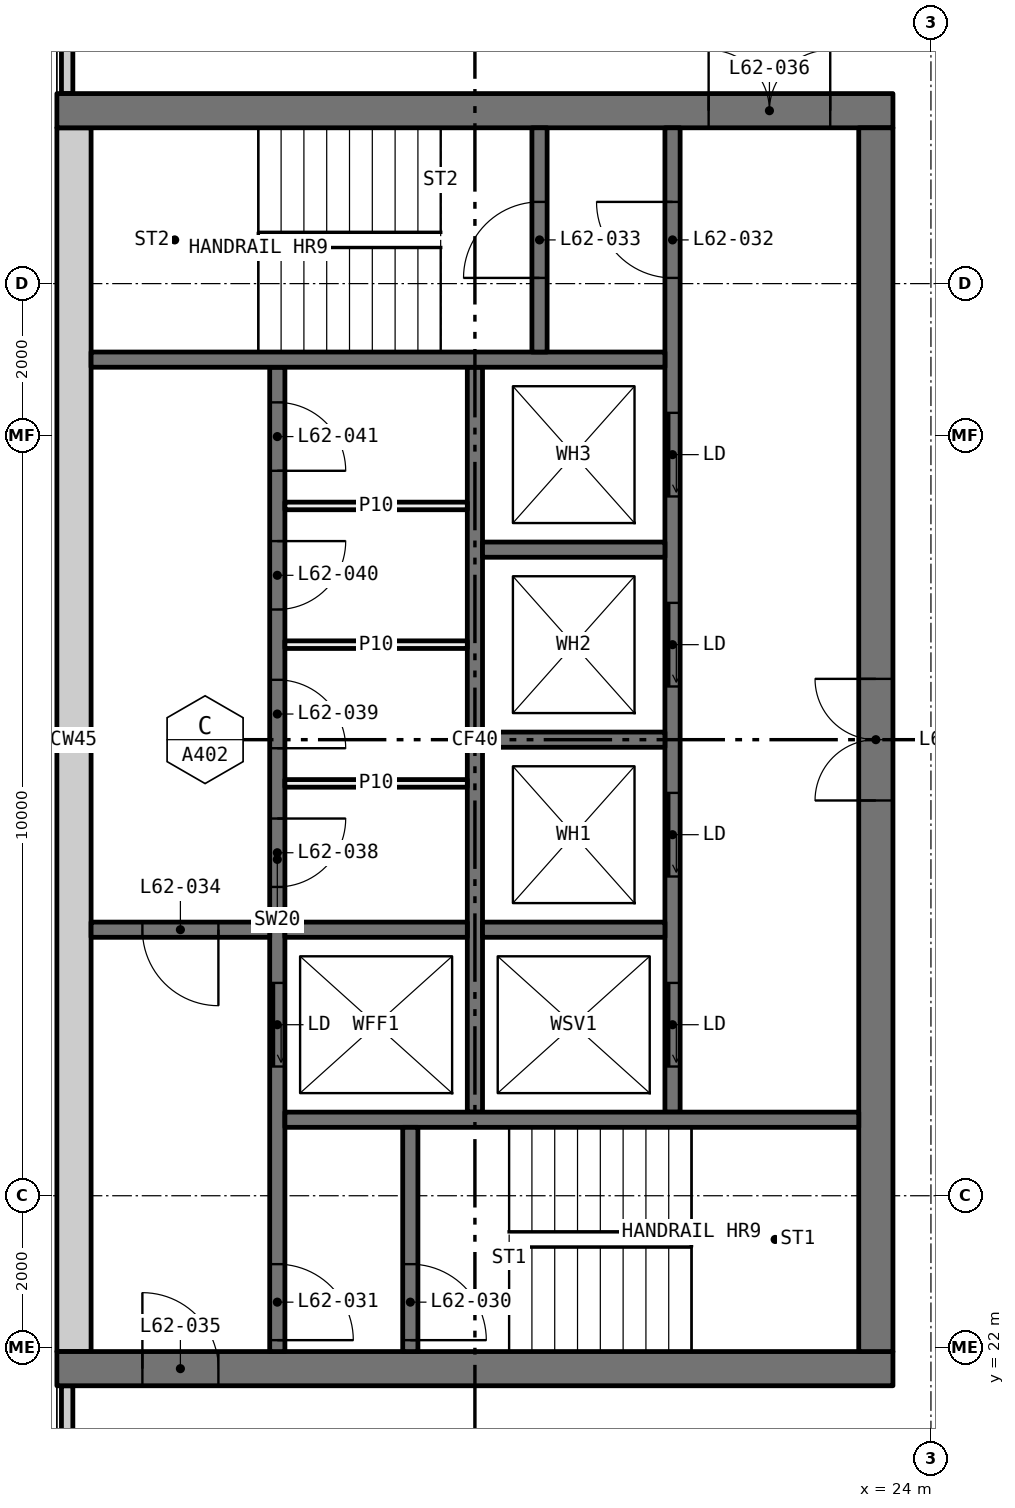
"""IFC4 building model, lengths in metres.
Left out: names, types, materials, properties, quantities, classifications, styles, units other than length and angle.
Written with IfcOpenShell. Run it as: python <this file> out.ifc"""

import sys

from ifc_helpers import new_model, si_unit, direction, frame, frame_2d, origin, place, context, subcontext, project, spatial, rectangle, extrude, element, fill, save


model = new_model("IFC4")
c1 = context("Model", 3, precision=1e-05, world=origin(), true_north=direction((0.0, 1.0)))
c2 = subcontext(c1, "Body", "Model", "MODEL_VIEW")
j1 = project(units=[si_unit("LENGTHUNIT", "METRE"), si_unit("PLANEANGLEUNIT", "RADIAN")], contexts=[c1])
p1 = place(None, origin())
s1 = spatial("IfcSite", under=j1, at=p1, CompositionType="ELEMENT")
p2 = place(p1, origin())
s2 = spatial("IfcBuilding", under=s1, at=p2, CompositionType="ELEMENT")
p3 = place(p2, frame((0.0, 0.0, 231.75)))
s3 = spatial("IfcBuildingStorey", under=s2, at=p3, CompositionType="ELEMENT", Elevation=231.75)
for number, where, z_axis, x_axis in (
    (1, (12.635, 18.71, 0.0), (0.0, 0.0, 1.0), (0.0, 1.0, 0.0)),
    (2, (12.635, 38.5, 0.0), (0.0, 0.0, 1.0), (0.0, 1.0, 0.0)),
):
    element("IfcWall", number, at=place(p3, frame(where, z_axis=z_axis, x_axis=x_axis)), inside=s3, PredefinedType="ELEMENTEDWALL", context=c2, shape_type="SweptSolid", body=[
        extrude(rectangle(XDim=2.79, YDim=0.15, at=frame_2d((1.395, 0.0))), origin(), (0.0, 0.0, 1.0), 3.05),
    ])
p4 = place(p3, frame((12.5, 21.725, 0.0), z_axis=(0.0, 0.0, 1.0), x_axis=(1.0, 0.0, 0.0)))
e3 = element("IfcWall", 3, at=p4, inside=s3, PredefinedType="SHEAR", context=c2, shape_type="SweptSolid", body=[
    extrude(rectangle(XDim=11.0, YDim=0.45, at=frame_2d((5.5, 0.0))), origin(), (0.0, 0.0, 1.0), 3.05),
])
p5 = place(p4, frame((1.125, 0.0, 0.0)))
e4 = element("IfcOpeningElement", 4, at=p5, cuts=e3, PredefinedType="OPENING", context=c2, shape_type="SweptSolid", body=[
    extrude(rectangle(XDim=1.0, YDim=2.1, at=frame_2d((0.5, 1.05))), frame((0.0, 0.235, 0.0), z_axis=(0.0, -1.0, 0.0), x_axis=(1.0, 0.0, 0.0)), (0.0, 0.0, 1.0), 0.47),
])
p6 = place(p3, frame((12.5, 38.275, 0.0), z_axis=(0.0, 0.0, 1.0), x_axis=(1.0, 0.0, 0.0)))
e5 = element("IfcWall", 5, at=p6, inside=s3, PredefinedType="SHEAR", context=c2, shape_type="SweptSolid", body=[
    extrude(rectangle(XDim=11.0, YDim=0.45, at=frame_2d((5.5, 0.0))), origin(), (0.0, 0.0, 1.0), 3.05),
])
p7 = place(p6, frame((8.575, 0.0, 0.0)))
e6 = element("IfcOpeningElement", 6, at=p7, cuts=e5, PredefinedType="OPENING", context=c2, shape_type="SweptSolid", body=[
    extrude(rectangle(XDim=1.6, YDim=2.1, at=frame_2d((0.8, 1.05))), frame((0.0, 0.235, 0.0), z_axis=(0.0, -1.0, 0.0), x_axis=(1.0, 0.0, 0.0)), (0.0, 0.0, 1.0), 0.47),
])
p8 = place(p3, frame((12.725, 21.95, 0.0), z_axis=(0.0, 0.0, 1.0), x_axis=(0.0, 1.0, 0.0)))
e7 = element("IfcWall", 7, at=p8, inside=s3, PredefinedType="SHEAR", context=c2, shape_type="SweptSolid", body=[
    extrude(rectangle(XDim=16.1, YDim=0.45, at=frame_2d((8.05, 0.0))), origin(), (0.0, 0.0, 1.0), 3.05),
])
p9 = place(p3, frame((23.275, 21.95, 0.0), z_axis=(0.0, 0.0, 1.0), x_axis=(0.0, 1.0, 0.0)))
e8 = element("IfcWall", 8, at=p9, inside=s3, PredefinedType="SHEAR", context=c2, shape_type="SweptSolid", body=[
    extrude(rectangle(XDim=16.1, YDim=0.45, at=frame_2d((8.05, 0.0))), origin(), (0.0, 0.0, 1.0), 3.05),
])
p10 = place(p9, frame((7.25, 0.0, 0.0)))
e9 = element("IfcOpeningElement", 9, at=p10, cuts=e8, PredefinedType="OPENING", context=c2, shape_type="SweptSolid", body=[
    extrude(rectangle(XDim=1.6, YDim=2.1, at=frame_2d((0.8, 1.05))), frame((0.0, 0.235, 0.0), z_axis=(0.0, -1.0, 0.0), x_axis=(1.0, 0.0, 0.0)), (0.0, 0.0, 1.0), 0.47),
])
p11 = place(p3, frame((15.4, 21.95, 0.0), z_axis=(0.0, 0.0, 1.0), x_axis=(0.0, 1.0, 0.0)))
e10 = element("IfcWall", 10, at=p11, inside=s3, PredefinedType="SOLIDWALL", context=c2, shape_type="SweptSolid", body=[
    extrude(rectangle(XDim=12.95, YDim=0.2, at=frame_2d((6.475, 0.0))), origin(), (0.0, 0.0, 1.0), 3.05),
])
p12 = place(p11, frame((3.75, 0.0, 0.0)))
e11 = element("IfcOpeningElement", 11, at=p12, cuts=e10, PredefinedType="OPENING", context=c2, shape_type="SweptSolid", body=[
    extrude(rectangle(XDim=1.1, YDim=2.1, at=frame_2d((0.55, 1.05))), frame((0.0, 0.11, 0.0), z_axis=(0.0, -1.0, 0.0), x_axis=(1.0, 0.0, 0.0)), (0.0, 0.0, 1.0), 0.22),
])
p13 = place(p11, frame((0.15, 0.0, 0.0)))
e12 = element("IfcOpeningElement", 12, at=p13, cuts=e10, PredefinedType="OPENING", context=c2, shape_type="SweptSolid", body=[
    extrude(rectangle(XDim=1.0, YDim=2.1, at=frame_2d((0.5, 1.05))), frame((0.0, 0.11, 0.0), z_axis=(0.0, -1.0, 0.0), x_axis=(1.0, 0.0, 0.0)), (0.0, 0.0, 1.0), 0.22),
])
p14 = place(p11, frame((6.113, 0.0, 0.0)))
e13 = element("IfcOpeningElement", 13, at=p14, cuts=e10, PredefinedType="OPENING", context=c2, shape_type="SweptSolid", body=[
    extrude(rectangle(XDim=0.9, YDim=2.1, at=frame_2d((0.45, 1.05))), frame((0.0, 0.11, 0.0), z_axis=(0.0, -1.0, 0.0), x_axis=(1.0, 0.0, 0.0)), (0.0, 0.0, 1.0), 0.22),
])
p15 = place(p11, frame((7.938, 0.0, 0.0)))
e14 = element("IfcOpeningElement", 14, at=p15, cuts=e10, PredefinedType="OPENING", context=c2, shape_type="SweptSolid", body=[
    extrude(rectangle(XDim=0.9, YDim=2.1, at=frame_2d((0.45, 1.05))), frame((0.0, 0.11, 0.0), z_axis=(0.0, -1.0, 0.0), x_axis=(1.0, 0.0, 0.0)), (0.0, 0.0, 1.0), 0.22),
])
p16 = place(p11, frame((9.762, 0.0, 0.0)))
e15 = element("IfcOpeningElement", 15, at=p16, cuts=e10, PredefinedType="OPENING", context=c2, shape_type="SweptSolid", body=[
    extrude(rectangle(XDim=0.9, YDim=2.1, at=frame_2d((0.45, 1.05))), frame((0.0, 0.11, 0.0), z_axis=(0.0, -1.0, 0.0), x_axis=(1.0, 0.0, 0.0)), (0.0, 0.0, 1.0), 0.22),
])
p17 = place(p11, frame((11.587, 0.0, 0.0)))
e16 = element("IfcOpeningElement", 16, at=p17, cuts=e10, PredefinedType="OPENING", context=c2, shape_type="SweptSolid", body=[
    extrude(rectangle(XDim=0.9, YDim=2.1, at=frame_2d((0.45, 1.05))), frame((0.0, 0.11, 0.0), z_axis=(0.0, -1.0, 0.0), x_axis=(1.0, 0.0, 0.0)), (0.0, 0.0, 1.0), 0.22),
])
p18 = place(p3, frame((20.6, 25.1, 0.0), z_axis=(0.0, 0.0, 1.0), x_axis=(0.0, 1.0, 0.0)))
e17 = element("IfcWall", 17, at=p18, inside=s3, PredefinedType="SOLIDWALL", context=c2, shape_type="SweptSolid", body=[
    extrude(rectangle(XDim=12.95, YDim=0.2, at=frame_2d((6.475, 0.0))), origin(), (0.0, 0.0, 1.0), 3.05),
])
p19 = place(p18, frame((0.6, 0.0, 0.0)))
e18 = element("IfcOpeningElement", 18, at=p19, cuts=e17, PredefinedType="OPENING", context=c2, shape_type="SweptSolid", body=[
    extrude(rectangle(XDim=1.1, YDim=2.1, at=frame_2d((0.55, 1.05))), frame((0.0, 0.11, 0.0), z_axis=(0.0, -1.0, 0.0), x_axis=(1.0, 0.0, 0.0)), (0.0, 0.0, 1.0), 0.22),
])
p20 = place(p18, frame((3.1, 0.0, 0.0)))
e19 = element("IfcOpeningElement", 19, at=p20, cuts=e17, PredefinedType="OPENING", context=c2, shape_type="SweptSolid", body=[
    extrude(rectangle(XDim=1.1, YDim=2.1, at=frame_2d((0.55, 1.05))), frame((0.0, 0.11, 0.0), z_axis=(0.0, -1.0, 0.0), x_axis=(1.0, 0.0, 0.0)), (0.0, 0.0, 1.0), 0.22),
])
p21 = place(p18, frame((5.6, 0.0, 0.0)))
e20 = element("IfcOpeningElement", 20, at=p21, cuts=e17, PredefinedType="OPENING", context=c2, shape_type="SweptSolid", body=[
    extrude(rectangle(XDim=1.1, YDim=2.1, at=frame_2d((0.55, 1.05))), frame((0.0, 0.11, 0.0), z_axis=(0.0, -1.0, 0.0), x_axis=(1.0, 0.0, 0.0)), (0.0, 0.0, 1.0), 0.22),
])
p22 = place(p18, frame((8.1, 0.0, 0.0)))
e21 = element("IfcOpeningElement", 21, at=p22, cuts=e17, PredefinedType="OPENING", context=c2, shape_type="SweptSolid", body=[
    extrude(rectangle(XDim=1.1, YDim=2.1, at=frame_2d((0.55, 1.05))), frame((0.0, 0.11, 0.0), z_axis=(0.0, -1.0, 0.0), x_axis=(1.0, 0.0, 0.0)), (0.0, 0.0, 1.0), 0.22),
])
p23 = place(p18, frame((10.975, 0.0, 0.0)))
e22 = element("IfcOpeningElement", 22, at=p23, cuts=e17, PredefinedType="OPENING", context=c2, shape_type="SweptSolid", body=[
    extrude(rectangle(XDim=1.0, YDim=2.1, at=frame_2d((0.5, 1.05))), frame((0.0, 0.11, 0.0), z_axis=(0.0, -1.0, 0.0), x_axis=(1.0, 0.0, 0.0)), (0.0, 0.0, 1.0), 0.22),
])
p24 = place(p3, frame((18.0, 25.1, 0.0), z_axis=(0.0, 0.0, 1.0), x_axis=(0.0, 1.0, 0.0)))
e23 = element("IfcWall", 23, at=p24, inside=s3, PredefinedType="SOLIDWALL", context=c2, shape_type="SweptSolid", body=[
    extrude(rectangle(XDim=9.8, YDim=0.2, at=frame_2d((4.9, 0.0))), origin(), (0.0, 0.0, 1.0), 3.05),
])
for number, where, z_axis, x_axis in (
    (24, (15.5, 25.0, 0.0), (0.0, 0.0, 1.0), (1.0, 0.0, 0.0)),
    (25, (12.95, 35.0, 0.0), (0.0, 0.0, 1.0), (1.0, 0.0, 0.0)),
):
    element("IfcWall", number, at=place(p3, frame(where, z_axis=z_axis, x_axis=x_axis)), inside=s3, PredefinedType="SOLIDWALL", context=c2, shape_type="SweptSolid", body=[
        extrude(rectangle(XDim=7.55, YDim=0.2, at=frame_2d((3.775, 0.0))), origin(), (0.0, 0.0, 1.0), 3.05),
    ])
p25 = place(p3, frame((12.95, 27.5, 0.0), z_axis=(0.0, 0.0, 1.0), x_axis=(1.0, 0.0, 0.0)))
e26 = element("IfcWall", 26, at=p25, inside=s3, PredefinedType="SOLIDWALL", context=c2, shape_type="SweptSolid", body=[
    extrude(rectangle(XDim=2.35, YDim=0.2, at=frame_2d((1.175, 0.0))), origin(), (0.0, 0.0, 1.0), 3.05),
])
p26 = place(p25, frame((0.675, 0.0, 0.0)))
e27 = element("IfcOpeningElement", 27, at=p26, cuts=e26, PredefinedType="OPENING", context=c2, shape_type="SweptSolid", body=[
    extrude(rectangle(XDim=1.0, YDim=2.1, at=frame_2d((0.5, 1.05))), frame((0.0, 0.11, 0.0), z_axis=(0.0, -1.0, 0.0), x_axis=(1.0, 0.0, 0.0)), (0.0, 0.0, 1.0), 0.22),
])
p27 = place(p3, frame((17.15, 21.95, 0.0), z_axis=(0.0, 0.0, 1.0), x_axis=(0.0, 1.0, 0.0)))
e28 = element("IfcWall", 28, at=p27, inside=s3, PredefinedType="SOLIDWALL", context=c2, shape_type="SweptSolid", body=[
    extrude(rectangle(XDim=2.95, YDim=0.2, at=frame_2d((1.475, 0.0))), origin(), (0.0, 0.0, 1.0), 3.05),
])
p28 = place(p27, frame((0.15, 0.0, 0.0)))
e29 = element("IfcOpeningElement", 29, at=p28, cuts=e28, PredefinedType="OPENING", context=c2, shape_type="SweptSolid", body=[
    extrude(rectangle(XDim=1.0, YDim=2.1, at=frame_2d((0.5, 1.05))), frame((0.0, 0.11, 0.0), z_axis=(0.0, -1.0, 0.0), x_axis=(1.0, 0.0, 0.0)), (0.0, 0.0, 1.0), 0.22),
])
p29 = place(p3, frame((18.85, 35.1, 0.0), z_axis=(0.0, 0.0, 1.0), x_axis=(0.0, 1.0, 0.0)))
e30 = element("IfcWall", 30, at=p29, inside=s3, PredefinedType="SOLIDWALL", context=c2, shape_type="SweptSolid", body=[
    extrude(rectangle(XDim=2.95, YDim=0.2, at=frame_2d((1.475, 0.0))), origin(), (0.0, 0.0, 1.0), 3.05),
])
p30 = place(p29, frame((0.975, 0.0, 0.0)))
e31 = element("IfcOpeningElement", 31, at=p30, cuts=e30, PredefinedType="OPENING", context=c2, shape_type="SweptSolid", body=[
    extrude(rectangle(XDim=1.0, YDim=2.1, at=frame_2d((0.5, 1.05))), frame((0.0, 0.11, 0.0), z_axis=(0.0, -1.0, 0.0), x_axis=(1.0, 0.0, 0.0)), (0.0, 0.0, 1.0), 0.22),
])
for number, where, z_axis, x_axis in (
    (32, (15.5, 27.5, 0.0), (0.0, 0.0, 1.0), (1.0, 0.0, 0.0)),
    (33, (18.1, 27.5, 0.0), (0.0, 0.0, 1.0), (1.0, 0.0, 0.0)),
    (34, (18.1, 30.0, 0.0), (0.0, 0.0, 1.0), (1.0, 0.0, 0.0)),
    (35, (18.1, 32.5, 0.0), (0.0, 0.0, 1.0), (1.0, 0.0, 0.0)),
):
    element("IfcWall", number, at=place(p3, frame(where, z_axis=z_axis, x_axis=x_axis)), inside=s3, PredefinedType="SOLIDWALL", context=c2, shape_type="SweptSolid", body=[
        extrude(rectangle(XDim=2.4, YDim=0.2, at=frame_2d((1.2, 0.0))), origin(), (0.0, 0.0, 1.0), 3.05),
    ])
for number, where, z_axis, x_axis in (
    (36, (15.5, 29.425, 0.0), (0.0, 0.0, 1.0), (1.0, 0.0, 0.0)),
    (37, (15.5, 31.25, 0.0), (0.0, 0.0, 1.0), (1.0, 0.0, 0.0)),
    (38, (15.5, 33.075, 0.0), (0.0, 0.0, 1.0), (1.0, 0.0, 0.0)),
):
    element("IfcWall", number, at=place(p3, frame(where, z_axis=z_axis, x_axis=x_axis)), inside=s3, PredefinedType="PARTITIONING", context=c2, shape_type="SweptSolid", body=[
        extrude(rectangle(XDim=2.4, YDim=0.1, at=frame_2d((1.2, 0.0))), origin(), (0.0, 0.0, 1.0), 3.05),
    ])
p31 = place(p19, origin())
e39 = element("IfcDoor", 39, at=p31, inside=s3, OperationType="SLIDING_TO_LEFT", PredefinedType="DOOR", context=c2, shape_type="SweptSolid", body=[
    extrude(rectangle(XDim=1.1, YDim=2.1, at=frame_2d((0.55, 1.05))), frame((0.0, 0.025, 0.0), z_axis=(0.0, -1.0, 0.0), x_axis=(1.0, 0.0, 0.0)), (0.0, 0.0, 1.0), 0.05),
])
fill(e18, e39)
p32 = place(p20, origin())
e40 = element("IfcDoor", 40, at=p32, inside=s3, OperationType="SLIDING_TO_LEFT", PredefinedType="DOOR", context=c2, shape_type="SweptSolid", body=[
    extrude(rectangle(XDim=1.1, YDim=2.1, at=frame_2d((0.55, 1.05))), frame((0.0, 0.025, 0.0), z_axis=(0.0, -1.0, 0.0), x_axis=(1.0, 0.0, 0.0)), (0.0, 0.0, 1.0), 0.05),
])
fill(e19, e40)
p33 = place(p21, origin())
e41 = element("IfcDoor", 41, at=p33, inside=s3, OperationType="SLIDING_TO_LEFT", PredefinedType="DOOR", context=c2, shape_type="SweptSolid", body=[
    extrude(rectangle(XDim=1.1, YDim=2.1, at=frame_2d((0.55, 1.05))), frame((0.0, 0.025, 0.0), z_axis=(0.0, -1.0, 0.0), x_axis=(1.0, 0.0, 0.0)), (0.0, 0.0, 1.0), 0.05),
])
fill(e20, e41)
p34 = place(p22, origin())
e42 = element("IfcDoor", 42, at=p34, inside=s3, OperationType="SLIDING_TO_LEFT", PredefinedType="DOOR", context=c2, shape_type="SweptSolid", body=[
    extrude(rectangle(XDim=1.1, YDim=2.1, at=frame_2d((0.55, 1.05))), frame((0.0, 0.025, 0.0), z_axis=(0.0, -1.0, 0.0), x_axis=(1.0, 0.0, 0.0)), (0.0, 0.0, 1.0), 0.05),
])
fill(e21, e42)
p35 = place(p12, origin())
e43 = element("IfcDoor", 43, at=p35, inside=s3, OperationType="SLIDING_TO_LEFT", PredefinedType="DOOR", context=c2, shape_type="SweptSolid", body=[
    extrude(rectangle(XDim=1.1, YDim=2.1, at=frame_2d((0.55, 1.05))), frame((0.0, 0.025, 0.0), z_axis=(0.0, -1.0, 0.0), x_axis=(1.0, 0.0, 0.0)), (0.0, 0.0, 1.0), 0.05),
])
fill(e11, e43)
p36 = place(p28, frame((1.0, 0.0, 0.0), x_axis=(-1.0, 0.0, 0.0)))
e44 = element("IfcDoor", 44, at=p36, inside=s3, OperationType="SINGLE_SWING_LEFT", PredefinedType="DOOR", context=c2, shape_type="SweptSolid", body=[
    extrude(rectangle(XDim=1.0, YDim=2.1, at=frame_2d((0.5, 1.05))), frame((0.0, 0.025, 0.0), z_axis=(0.0, -1.0, 0.0), x_axis=(1.0, 0.0, 0.0)), (0.0, 0.0, 1.0), 0.05),
])
fill(e29, e44)
p37 = place(p13, frame((1.0, 0.0, 0.0), x_axis=(-1.0, 0.0, 0.0)))
e45 = element("IfcDoor", 45, at=p37, inside=s3, OperationType="SINGLE_SWING_LEFT", PredefinedType="DOOR", context=c2, shape_type="SweptSolid", body=[
    extrude(rectangle(XDim=1.0, YDim=2.1, at=frame_2d((0.5, 1.05))), frame((0.0, 0.025, 0.0), z_axis=(0.0, -1.0, 0.0), x_axis=(1.0, 0.0, 0.0)), (0.0, 0.0, 1.0), 0.05),
])
fill(e12, e45)
p38 = place(p23, origin())
e46 = element("IfcDoor", 46, at=p38, inside=s3, OperationType="SINGLE_SWING_LEFT", PredefinedType="DOOR", context=c2, shape_type="SweptSolid", body=[
    extrude(rectangle(XDim=1.0, YDim=2.1, at=frame_2d((0.5, 1.05))), frame((0.0, 0.025, 0.0), z_axis=(0.0, -1.0, 0.0), x_axis=(1.0, 0.0, 0.0)), (0.0, 0.0, 1.0), 0.05),
])
fill(e22, e46)
p39 = place(p30, origin())
e47 = element("IfcDoor", 47, at=p39, inside=s3, OperationType="SINGLE_SWING_RIGHT", PredefinedType="DOOR", context=c2, shape_type="SweptSolid", body=[
    extrude(rectangle(XDim=1.0, YDim=2.1, at=frame_2d((0.5, 1.05))), frame((0.0, 0.025, 0.0), z_axis=(0.0, -1.0, 0.0), x_axis=(1.0, 0.0, 0.0)), (0.0, 0.0, 1.0), 0.05),
])
fill(e31, e47)
p40 = place(p26, frame((1.0, 0.0, 0.0), x_axis=(-1.0, 0.0, 0.0)))
e48 = element("IfcDoor", 48, at=p40, inside=s3, OperationType="SINGLE_SWING_RIGHT", PredefinedType="DOOR", context=c2, shape_type="SweptSolid", body=[
    extrude(rectangle(XDim=1.0, YDim=2.1, at=frame_2d((0.5, 1.05))), frame((0.0, 0.025, 0.0), z_axis=(0.0, -1.0, 0.0), x_axis=(1.0, 0.0, 0.0)), (0.0, 0.0, 1.0), 0.05),
])
fill(e27, e48)
p41 = place(p5, origin())
e49 = element("IfcDoor", 49, at=p41, inside=s3, OperationType="SINGLE_SWING_RIGHT", PredefinedType="DOOR", context=c2, shape_type="SweptSolid", body=[
    extrude(rectangle(XDim=1.0, YDim=2.1, at=frame_2d((0.5, 1.05))), frame((0.0, 0.025, 0.0), z_axis=(0.0, -1.0, 0.0), x_axis=(1.0, 0.0, 0.0)), (0.0, 0.0, 1.0), 0.05),
])
fill(e4, e49)
p42 = place(p7, origin())
e50 = element("IfcDoor", 50, at=p42, inside=s3, OperationType="DOUBLE_DOOR_SINGLE_SWING", PredefinedType="DOOR", context=c2, shape_type="SweptSolid", body=[
    extrude(rectangle(XDim=1.6, YDim=2.1, at=frame_2d((0.8, 1.05))), frame((0.0, 0.025, 0.0), z_axis=(0.0, -1.0, 0.0), x_axis=(1.0, 0.0, 0.0)), (0.0, 0.0, 1.0), 0.05),
])
fill(e6, e50)
p43 = place(p10, origin())
e51 = element("IfcDoor", 51, at=p43, inside=s3, OperationType="DOUBLE_DOOR_SINGLE_SWING", PredefinedType="DOOR", context=c2, shape_type="SweptSolid", body=[
    extrude(rectangle(XDim=1.6, YDim=2.1, at=frame_2d((0.8, 1.05))), frame((0.0, 0.025, 0.0), z_axis=(0.0, -1.0, 0.0), x_axis=(1.0, 0.0, 0.0)), (0.0, 0.0, 1.0), 0.05),
])
fill(e9, e51)
p44 = place(p14, frame((0.9, 0.0, 0.0), x_axis=(-1.0, 0.0, 0.0)))
e52 = element("IfcDoor", 52, at=p44, inside=s3, OperationType="SINGLE_SWING_RIGHT", PredefinedType="DOOR", context=c2, shape_type="SweptSolid", body=[
    extrude(rectangle(XDim=0.9, YDim=2.1, at=frame_2d((0.45, 1.05))), frame((0.0, 0.025, 0.0), z_axis=(0.0, -1.0, 0.0), x_axis=(1.0, 0.0, 0.0)), (0.0, 0.0, 1.0), 0.05),
])
fill(e13, e52)
p45 = place(p15, frame((0.9, 0.0, 0.0), x_axis=(-1.0, 0.0, 0.0)))
e53 = element("IfcDoor", 53, at=p45, inside=s3, OperationType="SINGLE_SWING_LEFT", PredefinedType="DOOR", context=c2, shape_type="SweptSolid", body=[
    extrude(rectangle(XDim=0.9, YDim=2.1, at=frame_2d((0.45, 1.05))), frame((0.0, 0.025, 0.0), z_axis=(0.0, -1.0, 0.0), x_axis=(1.0, 0.0, 0.0)), (0.0, 0.0, 1.0), 0.05),
])
fill(e14, e53)
p46 = place(p16, frame((0.9, 0.0, 0.0), x_axis=(-1.0, 0.0, 0.0)))
e54 = element("IfcDoor", 54, at=p46, inside=s3, OperationType="SINGLE_SWING_RIGHT", PredefinedType="DOOR", context=c2, shape_type="SweptSolid", body=[
    extrude(rectangle(XDim=0.9, YDim=2.1, at=frame_2d((0.45, 1.05))), frame((0.0, 0.025, 0.0), z_axis=(0.0, -1.0, 0.0), x_axis=(1.0, 0.0, 0.0)), (0.0, 0.0, 1.0), 0.05),
])
fill(e15, e54)
p47 = place(p17, frame((0.9, 0.0, 0.0), x_axis=(-1.0, 0.0, 0.0)))
e55 = element("IfcDoor", 55, at=p47, inside=s3, OperationType="SINGLE_SWING_LEFT", PredefinedType="DOOR", context=c2, shape_type="SweptSolid", body=[
    extrude(rectangle(XDim=0.9, YDim=2.1, at=frame_2d((0.45, 1.05))), frame((0.0, 0.025, 0.0), z_axis=(0.0, -1.0, 0.0), x_axis=(1.0, 0.0, 0.0)), (0.0, 0.0, 1.0), 0.05),
])
fill(e16, e55)
save(model, sys.argv[1])
